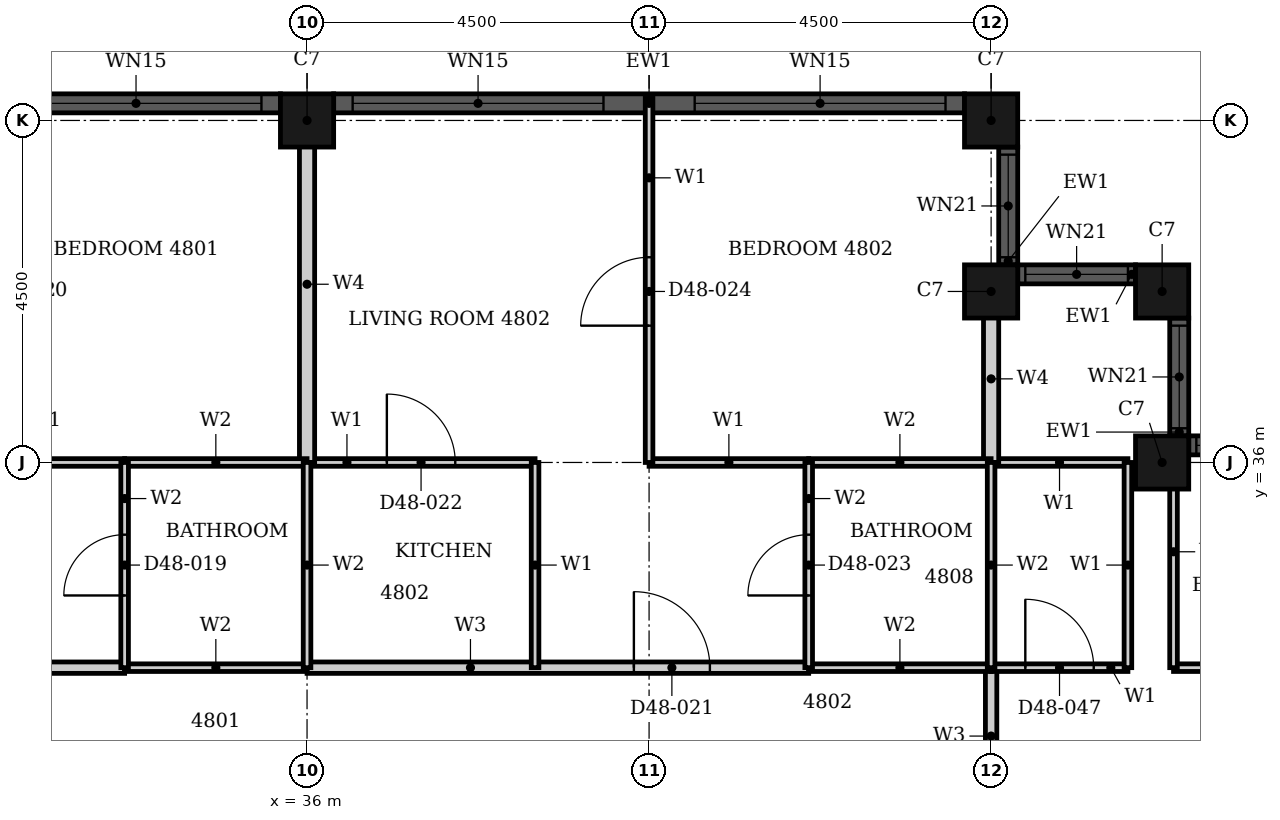
"""IFC4 building model, lengths in metres.
Left out: names, types, materials, properties, quantities, classifications, styles, units other than length and angle.
Written with IfcOpenShell. Run it as: python <this file> out.ifc"""

import sys

from ifc_helpers import new_model, si_unit, direction, frame, frame_2d, origin, origin_2d, place, context, subcontext, project, spatial, rectangle, hollow_rectangle, extrude, element, fill, save


model = new_model("IFC4")
c1 = context("Model", 3, precision=1e-05, world=origin(), true_north=direction((0.0, 1.0)))
c2 = subcontext(c1, "Body", "Model", "MODEL_VIEW")
j1 = project(units=[si_unit("LENGTHUNIT", "METRE"), si_unit("PLANEANGLEUNIT", "RADIAN")], contexts=[c1])
p1 = place(None, origin())
s1 = spatial("IfcSite", under=j1, at=p1, CompositionType="ELEMENT")
p2 = place(p1, origin())
s2 = spatial("IfcBuilding", under=s1, at=p2, CompositionType="ELEMENT")
p3 = place(p2, frame((0.0, 0.0, 192.4)))
s3 = spatial("IfcBuildingStorey", under=s2, at=p3, CompositionType="ELEMENT", Elevation=192.4)
for number, where, z_axis, x_axis in (
    (1, (47.25, 36.0, 0.0), (0.0, 0.0, 1.0), (1.0, 0.0, 0.0)),
    (2, (47.25, 38.25, 0.0), (0.0, 0.0, 1.0), (1.0, 0.0, 0.0)),
    (3, (45.0, 38.25, 0.0), (0.0, 0.0, 1.0), (1.0, 0.0, 0.0)),
    (4, (45.0, 40.5, 0.0), (0.0, 0.0, 1.0), (1.0, 0.0, 0.0)),
    (5, (36.0, 40.5, 0.0), (0.0, 0.0, 1.0), (1.0, 0.0, 0.0)),
):
    element("IfcColumn", number, at=place(p3, frame(where, z_axis=z_axis, x_axis=x_axis)), inside=s3, PredefinedType="COLUMN", context=c2, shape_type="SweptSolid", body=[
        extrude(hollow_rectangle(XDim=0.7, YDim=0.7, WallThickness=0.022, at=origin_2d()), origin(), (0.0, 0.0, 1.0), 3.7),
    ])
p4 = place(p3, frame((49.15, 36.225, 0.0), z_axis=(0.0, 0.0, 1.0), x_axis=(-1.0, 0.0, 0.0)))
e6 = element("IfcWall", 6, at=p4, inside=s3, PredefinedType="SOLIDWALL", context=c2, shape_type="SweptSolid", body=[
    extrude(rectangle(XDim=1.55, YDim=0.25, at=frame_2d((0.775, 0.0))), origin(), (0.0, 0.0, 1.0), 3.7),
])
p5 = place(p4, frame((0.1, 0.0, 0.9)))
e7 = element("IfcOpeningElement", 7, at=p5, cuts=e6, PredefinedType="OPENING", context=c2, shape_type="SweptSolid", body=[
    extrude(rectangle(XDim=1.35, YDim=1.85, at=frame_2d((0.675, 0.925))), frame((0.0, 0.135, 0.0), z_axis=(0.0, -1.0, 0.0), x_axis=(1.0, 0.0, 0.0)), (0.0, 0.0, 1.0), 0.27),
])
p6 = place(p3, frame((47.475, 36.35, 0.0), z_axis=(0.0, 0.0, 1.0), x_axis=(0.0, 1.0, 0.0)))
e8 = element("IfcWall", 8, at=p6, inside=s3, PredefinedType="SOLIDWALL", context=c2, shape_type="SweptSolid", body=[
    extrude(rectangle(XDim=1.55, YDim=0.25, at=frame_2d((0.775, 0.0))), origin(), (0.0, 0.0, 1.0), 3.7),
])
p7 = place(p6, frame((0.1, 0.0, 0.9)))
e9 = element("IfcOpeningElement", 9, at=p7, cuts=e8, PredefinedType="OPENING", context=c2, shape_type="SweptSolid", body=[
    extrude(rectangle(XDim=1.35, YDim=1.85, at=frame_2d((0.675, 0.925))), frame((0.0, 0.135, 0.0), z_axis=(0.0, -1.0, 0.0), x_axis=(1.0, 0.0, 0.0)), (0.0, 0.0, 1.0), 0.27),
])
p8 = place(p3, frame((46.9, 38.475, 0.0), z_axis=(0.0, 0.0, 1.0), x_axis=(-1.0, 0.0, 0.0)))
e10 = element("IfcWall", 10, at=p8, inside=s3, PredefinedType="SOLIDWALL", context=c2, shape_type="SweptSolid", body=[
    extrude(rectangle(XDim=1.55, YDim=0.25, at=frame_2d((0.775, 0.0))), origin(), (0.0, 0.0, 1.0), 3.7),
])
p9 = place(p8, frame((0.1, 0.0, 0.9)))
e11 = element("IfcOpeningElement", 11, at=p9, cuts=e10, PredefinedType="OPENING", context=c2, shape_type="SweptSolid", body=[
    extrude(rectangle(XDim=1.35, YDim=1.85, at=frame_2d((0.675, 0.925))), frame((0.0, 0.135, 0.0), z_axis=(0.0, -1.0, 0.0), x_axis=(1.0, 0.0, 0.0)), (0.0, 0.0, 1.0), 0.27),
])
p10 = place(p3, frame((45.225, 38.6, 0.0), z_axis=(0.0, 0.0, 1.0), x_axis=(0.0, 1.0, 0.0)))
e12 = element("IfcWall", 12, at=p10, inside=s3, PredefinedType="SOLIDWALL", context=c2, shape_type="SweptSolid", body=[
    extrude(rectangle(XDim=1.55, YDim=0.25, at=frame_2d((0.775, 0.0))), origin(), (0.0, 0.0, 1.0), 3.7),
])
p11 = place(p10, frame((0.1, 0.0, 0.9)))
e13 = element("IfcOpeningElement", 13, at=p11, cuts=e12, PredefinedType="OPENING", context=c2, shape_type="SweptSolid", body=[
    extrude(rectangle(XDim=1.35, YDim=1.85, at=frame_2d((0.675, 0.925))), frame((0.0, 0.135, 0.0), z_axis=(0.0, -1.0, 0.0), x_axis=(1.0, 0.0, 0.0)), (0.0, 0.0, 1.0), 0.27),
])
p12 = place(p3, frame((44.65, 40.725, 0.0), z_axis=(0.0, 0.0, 1.0), x_axis=(-1.0, 0.0, 0.0)))
e14 = element("IfcWall", 14, at=p12, inside=s3, PredefinedType="SOLIDWALL", context=c2, shape_type="SweptSolid", body=[
    extrude(rectangle(XDim=8.3, YDim=0.25, at=frame_2d((4.15, 0.0))), origin(), (0.0, 0.0, 1.0), 3.7),
])
p13 = place(p12, frame((0.25, 0.0, 0.45)))
e15 = element("IfcOpeningElement", 15, at=p13, cuts=e14, PredefinedType="OPENING", context=c2, shape_type="SweptSolid", body=[
    extrude(rectangle(XDim=3.3, YDim=2.3, at=frame_2d((1.65, 1.15))), frame((0.0, 0.135, 0.0), z_axis=(0.0, -1.0, 0.0), x_axis=(1.0, 0.0, 0.0)), (0.0, 0.0, 1.0), 0.27),
])
p14 = place(p12, frame((4.75, 0.0, 0.45)))
e16 = element("IfcOpeningElement", 16, at=p14, cuts=e14, PredefinedType="OPENING", context=c2, shape_type="SweptSolid", body=[
    extrude(rectangle(XDim=3.3, YDim=2.3, at=frame_2d((1.65, 1.15))), frame((0.0, 0.135, 0.0), z_axis=(0.0, -1.0, 0.0), x_axis=(1.0, 0.0, 0.0)), (0.0, 0.0, 1.0), 0.27),
])
p15 = place(p3, frame((35.65, 40.725, 0.0), z_axis=(0.0, 0.0, 1.0), x_axis=(-1.0, 0.0, 0.0)))
e17 = element("IfcWall", 17, at=p15, inside=s3, PredefinedType="SOLIDWALL", context=c2, shape_type="SweptSolid", body=[
    extrude(rectangle(XDim=8.3, YDim=0.25, at=frame_2d((4.15, 0.0))), origin(), (0.0, 0.0, 1.0), 3.7),
])
p16 = place(p15, frame((0.25, 0.0, 0.45)))
e18 = element("IfcOpeningElement", 18, at=p16, cuts=e17, PredefinedType="OPENING", context=c2, shape_type="SweptSolid", body=[
    extrude(rectangle(XDim=3.3, YDim=2.3, at=frame_2d((1.65, 1.15))), frame((0.0, 0.135, 0.0), z_axis=(0.0, -1.0, 0.0), x_axis=(1.0, 0.0, 0.0)), (0.0, 0.0, 1.0), 0.27),
])
p17 = place(p15, frame((4.75, 0.0, 0.45)))
e19 = element("IfcOpeningElement", 19, at=p17, cuts=e17, PredefinedType="OPENING", context=c2, shape_type="SweptSolid", body=[
    extrude(rectangle(XDim=3.3, YDim=2.3, at=frame_2d((1.65, 1.15))), frame((0.0, 0.135, 0.0), z_axis=(0.0, -1.0, 0.0), x_axis=(1.0, 0.0, 0.0)), (0.0, 0.0, 1.0), 0.27),
])
p18 = place(p3, frame((18.0, 33.3, 0.0), z_axis=(0.0, 0.0, 1.0), x_axis=(1.0, 0.0, 0.0)))
e20 = element("IfcWall", 20, at=p18, inside=s3, PredefinedType="PARTITIONING", context=c2, shape_type="SweptSolid", body=[
    extrude(rectangle(XDim=15.6, YDim=0.15, at=frame_2d((7.8, 0.0))), origin(), (0.0, 0.0, 1.0), 3.4),
])
p19 = place(p18, frame((4.0, 0.0, 0.0)))
e21 = element("IfcOpeningElement", 21, at=p19, cuts=e20, PredefinedType="OPENING", context=c2, shape_type="SweptSolid", body=[
    extrude(rectangle(XDim=1.0, YDim=2.1, at=frame_2d((0.5, 1.05))), frame((0.0, 0.085, 0.0), z_axis=(0.0, -1.0, 0.0), x_axis=(1.0, 0.0, 0.0)), (0.0, 0.0, 1.0), 0.17),
])
p20 = place(p18, frame((13.3, 0.0, 0.0)))
e22 = element("IfcOpeningElement", 22, at=p20, cuts=e20, PredefinedType="OPENING", context=c2, shape_type="SweptSolid", body=[
    extrude(rectangle(XDim=1.0, YDim=2.2, at=frame_2d((0.5, 1.1))), frame((0.0, 0.085, 0.0), z_axis=(0.0, -1.0, 0.0), x_axis=(1.0, 0.0, 0.0)), (0.0, 0.0, 1.0), 0.17),
])
p21 = place(p3, frame((36.0, 33.3, 0.0), z_axis=(0.0, 0.0, 1.0), x_axis=(1.0, 0.0, 0.0)))
e23 = element("IfcWall", 23, at=p21, inside=s3, PredefinedType="PARTITIONING", context=c2, shape_type="SweptSolid", body=[
    extrude(rectangle(XDim=6.6, YDim=0.15, at=frame_2d((3.3, 0.0))), origin(), (0.0, 0.0, 1.0), 3.4),
])
p22 = place(p21, frame((4.3, 0.0, 0.0)))
e24 = element("IfcOpeningElement", 24, at=p22, cuts=e23, PredefinedType="OPENING", context=c2, shape_type="SweptSolid", body=[
    extrude(rectangle(XDim=1.0, YDim=2.2, at=frame_2d((0.5, 1.1))), frame((0.0, 0.085, 0.0), z_axis=(0.0, -1.0, 0.0), x_axis=(1.0, 0.0, 0.0)), (0.0, 0.0, 1.0), 0.17),
])
p23 = place(p3, frame((45.0, 31.5, 0.0), z_axis=(0.0, 0.0, 1.0), x_axis=(0.0, 1.0, 0.0)))
e25 = element("IfcWall", 25, at=p23, inside=s3, PredefinedType="PARTITIONING", context=c2, shape_type="SweptSolid", body=[
    extrude(rectangle(XDim=1.8, YDim=0.15, at=frame_2d((0.9, 0.0))), origin(), (0.0, 0.0, 1.0), 3.4),
])
p24 = place(p3, frame((45.0, 33.3, 0.0), z_axis=(0.0, 0.0, 1.0), x_axis=(1.0, 0.0, 0.0)))
e26 = element("IfcWall", 26, at=p24, inside=s3, PredefinedType="PARTITIONING", context=c2, shape_type="SweptSolid", body=[
    extrude(rectangle(XDim=1.8, YDim=0.1, at=frame_2d((0.9, 0.0))), origin(), (0.0, 0.0, 1.0), 3.4),
])
p25 = place(p24, frame((0.45, 0.0, 0.0)))
e27 = element("IfcOpeningElement", 27, at=p25, cuts=e26, PredefinedType="OPENING", context=c2, shape_type="SweptSolid", body=[
    extrude(rectangle(XDim=0.9, YDim=2.1, at=frame_2d((0.45, 1.05))), frame((0.0, 0.06, 0.0), z_axis=(0.0, -1.0, 0.0), x_axis=(1.0, 0.0, 0.0)), (0.0, 0.0, 1.0), 0.12),
])
for number, where, z_axis, x_axis in (
    (28, (31.5, 36.0, 0.0), (0.0, 0.0, 1.0), (1.0, 0.0, 0.0)),
    (29, (40.5, 36.0, 0.0), (0.0, 0.0, 1.0), (1.0, 0.0, 0.0)),
):
    element("IfcWall", number, at=place(p3, frame(where, z_axis=z_axis, x_axis=x_axis)), inside=s3, PredefinedType="PARTITIONING", context=c2, shape_type="SweptSolid", body=[
        extrude(rectangle(XDim=2.1, YDim=0.1, at=frame_2d((1.05, 0.0))), origin(), (0.0, 0.0, 1.0), 3.4),
    ])
p26 = place(p3, frame((36.0, 36.0, 0.0), z_axis=(0.0, 0.0, 1.0), x_axis=(1.0, 0.0, 0.0)))
e30 = element("IfcWall", 30, at=p26, inside=s3, PredefinedType="PARTITIONING", context=c2, shape_type="SweptSolid", body=[
    extrude(rectangle(XDim=3.0, YDim=0.1, at=frame_2d((1.5, 0.0))), origin(), (0.0, 0.0, 1.0), 3.4),
])
p27 = place(p26, frame((1.05, 0.0, 0.0)))
e31 = element("IfcOpeningElement", 31, at=p27, cuts=e30, PredefinedType="OPENING", context=c2, shape_type="SweptSolid", body=[
    extrude(rectangle(XDim=0.9, YDim=2.1, at=frame_2d((0.45, 1.05))), frame((0.0, 0.06, 0.0), z_axis=(0.0, -1.0, 0.0), x_axis=(1.0, 0.0, 0.0)), (0.0, 0.0, 1.0), 0.12),
])
p28 = place(p3, frame((45.0, 36.0, 0.0), z_axis=(0.0, 0.0, 1.0), x_axis=(1.0, 0.0, 0.0)))
e32 = element("IfcWall", 32, at=p28, inside=s3, PredefinedType="PARTITIONING", context=c2, shape_type="SweptSolid", body=[
    extrude(rectangle(XDim=1.8, YDim=0.1, at=frame_2d((0.9, 0.0))), origin(), (0.0, 0.0, 1.0), 3.4),
])
p29 = place(p3, frame((39.0, 33.3, 0.0), z_axis=(0.0, 0.0, 1.0), x_axis=(0.0, 1.0, 0.0)))
e33 = element("IfcWall", 33, at=p29, inside=s3, PredefinedType="PARTITIONING", context=c2, shape_type="SweptSolid", body=[
    extrude(rectangle(XDim=2.7, YDim=0.1, at=frame_2d((1.35, 0.0))), origin(), (0.0, 0.0, 1.0), 3.4),
])
p30 = place(p3, frame((40.5, 36.0, 0.0), z_axis=(0.0, 0.0, 1.0), x_axis=(0.0, 1.0, 0.0)))
e34 = element("IfcWall", 34, at=p30, inside=s3, PredefinedType="PARTITIONING", context=c2, shape_type="SweptSolid", body=[
    extrude(rectangle(XDim=4.79, YDim=0.1, at=frame_2d((2.395, 0.0))), origin(), (0.0, 0.0, 1.0), 3.4),
])
p31 = place(p30, frame((1.8, 0.0, 0.0)))
e35 = element("IfcOpeningElement", 35, at=p31, cuts=e34, PredefinedType="OPENING", context=c2, shape_type="SweptSolid", body=[
    extrude(rectangle(XDim=0.9, YDim=2.1, at=frame_2d((0.45, 1.05))), frame((0.0, 0.06, 0.0), z_axis=(0.0, -1.0, 0.0), x_axis=(1.0, 0.0, 0.0)), (0.0, 0.0, 1.0), 0.12),
])
p32 = place(p3, frame((46.8, 33.3, 0.0), z_axis=(0.0, 0.0, 1.0), x_axis=(0.0, 1.0, 0.0)))
e36 = element("IfcWall", 36, at=p32, inside=s3, PredefinedType="PARTITIONING", context=c2, shape_type="SweptSolid", body=[
    extrude(rectangle(XDim=2.7, YDim=0.1, at=frame_2d((1.35, 0.0))), origin(), (0.0, 0.0, 1.0), 3.4),
])
p33 = place(p3, frame((36.0, 36.0, 0.0), z_axis=(0.0, 0.0, 1.0), x_axis=(0.0, 1.0, 0.0)))
e37 = element("IfcWall", 37, at=p33, inside=s3, PredefinedType="PARTITIONING", context=c2, shape_type="SweptSolid", body=[
    extrude(rectangle(XDim=4.69, YDim=0.2, at=frame_2d((2.345, 0.0))), origin(), (0.0, 0.0, 1.0), 3.4),
])
p34 = place(p3, frame((45.0, 36.0, 0.0), z_axis=(0.0, 0.0, 1.0), x_axis=(0.0, 1.0, 0.0)))
e38 = element("IfcWall", 38, at=p34, inside=s3, PredefinedType="PARTITIONING", context=c2, shape_type="SweptSolid", body=[
    extrude(rectangle(XDim=2.2, YDim=0.2, at=frame_2d((1.1, 0.0))), origin(), (0.0, 0.0, 1.0), 3.4),
])
for number, where, z_axis, x_axis in (
    (39, (33.6, 33.3, 0.0), (0.0, 0.0, 1.0), (1.0, 0.0, 0.0)),
    (40, (42.6, 33.3, 0.0), (0.0, 0.0, 1.0), (1.0, 0.0, 0.0)),
):
    element("IfcWall", number, at=place(p3, frame(where, z_axis=z_axis, x_axis=x_axis)), inside=s3, PredefinedType="PARTITIONING", context=c2, shape_type="SweptSolid", body=[
        extrude(rectangle(XDim=2.4, YDim=0.1, at=frame_2d((1.2, 0.0))), origin(), (0.0, 0.0, 1.0), 3.4),
    ])
p35 = place(p3, frame((47.4, 33.3, 0.0), z_axis=(0.0, 0.0, 1.0), x_axis=(1.0, 0.0, 0.0)))
e41 = element("IfcWall", 41, at=p35, inside=s3, PredefinedType="PARTITIONING", context=c2, shape_type="SweptSolid", body=[
    extrude(rectangle(XDim=2.2, YDim=0.1, at=frame_2d((1.1, 0.0))), origin(), (0.0, 0.0, 1.0), 3.4),
])
p36 = place(p35, frame((0.65, 0.0, 0.0)))
e42 = element("IfcOpeningElement", 42, at=p36, cuts=e41, PredefinedType="OPENING", context=c2, shape_type="SweptSolid", body=[
    extrude(rectangle(XDim=0.8, YDim=2.1, at=frame_2d((0.4, 1.05))), frame((0.0, 0.06, 0.0), z_axis=(0.0, -1.0, 0.0), x_axis=(1.0, 0.0, 0.0)), (0.0, 0.0, 1.0), 0.12),
])
for number, where, z_axis, x_axis in (
    (43, (33.6, 36.0, 0.0), (0.0, 0.0, 1.0), (1.0, 0.0, 0.0)),
    (44, (42.6, 36.0, 0.0), (0.0, 0.0, 1.0), (1.0, 0.0, 0.0)),
):
    element("IfcWall", number, at=place(p3, frame(where, z_axis=z_axis, x_axis=x_axis)), inside=s3, PredefinedType="PARTITIONING", context=c2, shape_type="SweptSolid", body=[
        extrude(rectangle(XDim=2.4, YDim=0.1, at=frame_2d((1.2, 0.0))), origin(), (0.0, 0.0, 1.0), 3.4),
    ])
p37 = place(p3, frame((33.6, 33.3, 0.0), z_axis=(0.0, 0.0, 1.0), x_axis=(0.0, 1.0, 0.0)))
e45 = element("IfcWall", 45, at=p37, inside=s3, PredefinedType="PARTITIONING", context=c2, shape_type="SweptSolid", body=[
    extrude(rectangle(XDim=2.7, YDim=0.1, at=frame_2d((1.35, 0.0))), origin(), (0.0, 0.0, 1.0), 3.4),
])
p38 = place(p37, frame((0.95, 0.0, 0.0)))
e46 = element("IfcOpeningElement", 46, at=p38, cuts=e45, PredefinedType="OPENING", context=c2, shape_type="SweptSolid", body=[
    extrude(rectangle(XDim=0.8, YDim=2.1, at=frame_2d((0.4, 1.05))), frame((0.0, 0.06, 0.0), z_axis=(0.0, -1.0, 0.0), x_axis=(1.0, 0.0, 0.0)), (0.0, 0.0, 1.0), 0.12),
])
p39 = place(p3, frame((36.0, 33.3, 0.0), z_axis=(0.0, 0.0, 1.0), x_axis=(0.0, 1.0, 0.0)))
e47 = element("IfcWall", 47, at=p39, inside=s3, PredefinedType="PARTITIONING", context=c2, shape_type="SweptSolid", body=[
    extrude(rectangle(XDim=2.7, YDim=0.1, at=frame_2d((1.35, 0.0))), origin(), (0.0, 0.0, 1.0), 3.4),
])
p40 = place(p3, frame((42.6, 33.3, 0.0), z_axis=(0.0, 0.0, 1.0), x_axis=(0.0, 1.0, 0.0)))
e48 = element("IfcWall", 48, at=p40, inside=s3, PredefinedType="PARTITIONING", context=c2, shape_type="SweptSolid", body=[
    extrude(rectangle(XDim=2.7, YDim=0.1, at=frame_2d((1.35, 0.0))), origin(), (0.0, 0.0, 1.0), 3.4),
])
p41 = place(p40, frame((0.95, 0.0, 0.0)))
e49 = element("IfcOpeningElement", 49, at=p41, cuts=e48, PredefinedType="OPENING", context=c2, shape_type="SweptSolid", body=[
    extrude(rectangle(XDim=0.8, YDim=2.1, at=frame_2d((0.4, 1.05))), frame((0.0, 0.06, 0.0), z_axis=(0.0, -1.0, 0.0), x_axis=(1.0, 0.0, 0.0)), (0.0, 0.0, 1.0), 0.12),
])
p42 = place(p3, frame((45.0, 33.3, 0.0), z_axis=(0.0, 0.0, 1.0), x_axis=(0.0, 1.0, 0.0)))
e50 = element("IfcWall", 50, at=p42, inside=s3, PredefinedType="PARTITIONING", context=c2, shape_type="SweptSolid", body=[
    extrude(rectangle(XDim=2.7, YDim=0.1, at=frame_2d((1.35, 0.0))), origin(), (0.0, 0.0, 1.0), 3.4),
])
p43 = place(p3, frame((47.4, 33.3, 0.0), z_axis=(0.0, 0.0, 1.0), x_axis=(0.0, 1.0, 0.0)))
e51 = element("IfcWall", 51, at=p43, inside=s3, PredefinedType="PARTITIONING", context=c2, shape_type="SweptSolid", body=[
    extrude(rectangle(XDim=3.05, YDim=0.1, at=frame_2d((1.525, 0.0))), origin(), (0.0, 0.0, 1.0), 3.4),
])
p44 = place(p5, origin())
e52 = element("IfcWindow", 52, at=p44, inside=s3, PartitioningType="SINGLE_PANEL", PredefinedType="WINDOW", context=c2, shape_type="SweptSolid", body=[
    extrude(rectangle(XDim=1.35, YDim=1.85, at=frame_2d((0.675, 0.925))), frame((0.0, 0.03, 0.0), z_axis=(0.0, -1.0, 0.0), x_axis=(1.0, 0.0, 0.0)), (0.0, 0.0, 1.0), 0.06),
])
fill(e7, e52)
p45 = place(p7, origin())
e53 = element("IfcWindow", 53, at=p45, inside=s3, PartitioningType="SINGLE_PANEL", PredefinedType="WINDOW", context=c2, shape_type="SweptSolid", body=[
    extrude(rectangle(XDim=1.35, YDim=1.85, at=frame_2d((0.675, 0.925))), frame((0.0, 0.03, 0.0), z_axis=(0.0, -1.0, 0.0), x_axis=(1.0, 0.0, 0.0)), (0.0, 0.0, 1.0), 0.06),
])
fill(e9, e53)
p46 = place(p9, origin())
e54 = element("IfcWindow", 54, at=p46, inside=s3, PartitioningType="SINGLE_PANEL", PredefinedType="WINDOW", context=c2, shape_type="SweptSolid", body=[
    extrude(rectangle(XDim=1.35, YDim=1.85, at=frame_2d((0.675, 0.925))), frame((0.0, 0.03, 0.0), z_axis=(0.0, -1.0, 0.0), x_axis=(1.0, 0.0, 0.0)), (0.0, 0.0, 1.0), 0.06),
])
fill(e11, e54)
p47 = place(p11, origin())
e55 = element("IfcWindow", 55, at=p47, inside=s3, PartitioningType="SINGLE_PANEL", PredefinedType="WINDOW", context=c2, shape_type="SweptSolid", body=[
    extrude(rectangle(XDim=1.35, YDim=1.85, at=frame_2d((0.675, 0.925))), frame((0.0, 0.03, 0.0), z_axis=(0.0, -1.0, 0.0), x_axis=(1.0, 0.0, 0.0)), (0.0, 0.0, 1.0), 0.06),
])
fill(e13, e55)
p48 = place(p13, origin())
e56 = element("IfcWindow", 56, at=p48, inside=s3, PartitioningType="SINGLE_PANEL", PredefinedType="WINDOW", context=c2, shape_type="SweptSolid", body=[
    extrude(rectangle(XDim=3.3, YDim=2.3, at=frame_2d((1.65, 1.15))), frame((0.0, 0.03, 0.0), z_axis=(0.0, -1.0, 0.0), x_axis=(1.0, 0.0, 0.0)), (0.0, 0.0, 1.0), 0.06),
])
fill(e15, e56)
p49 = place(p14, origin())
e57 = element("IfcWindow", 57, at=p49, inside=s3, PartitioningType="SINGLE_PANEL", PredefinedType="WINDOW", context=c2, shape_type="SweptSolid", body=[
    extrude(rectangle(XDim=3.3, YDim=2.3, at=frame_2d((1.65, 1.15))), frame((0.0, 0.03, 0.0), z_axis=(0.0, -1.0, 0.0), x_axis=(1.0, 0.0, 0.0)), (0.0, 0.0, 1.0), 0.06),
])
fill(e16, e57)
p50 = place(p16, origin())
e58 = element("IfcWindow", 58, at=p50, inside=s3, PartitioningType="SINGLE_PANEL", PredefinedType="WINDOW", context=c2, shape_type="SweptSolid", body=[
    extrude(rectangle(XDim=3.3, YDim=2.3, at=frame_2d((1.65, 1.15))), frame((0.0, 0.03, 0.0), z_axis=(0.0, -1.0, 0.0), x_axis=(1.0, 0.0, 0.0)), (0.0, 0.0, 1.0), 0.06),
])
fill(e18, e58)
p51 = place(p38, origin())
e59 = element("IfcDoor", 59, at=p51, inside=s3, OperationType="SINGLE_SWING_LEFT", PredefinedType="DOOR", context=c2, shape_type="SweptSolid", body=[
    extrude(rectangle(XDim=0.8, YDim=2.1, at=frame_2d((0.4, 1.05))), frame((0.0, 0.025, 0.0), z_axis=(0.0, -1.0, 0.0), x_axis=(1.0, 0.0, 0.0)), (0.0, 0.0, 1.0), 0.05),
])
fill(e46, e59)
p52 = place(p22, origin())
e60 = element("IfcDoor", 60, at=p52, inside=s3, OperationType="SINGLE_SWING_LEFT", PredefinedType="DOOR", context=c2, shape_type="SweptSolid", body=[
    extrude(rectangle(XDim=1.0, YDim=2.2, at=frame_2d((0.5, 1.1))), frame((0.0, 0.025, 0.0), z_axis=(0.0, -1.0, 0.0), x_axis=(1.0, 0.0, 0.0)), (0.0, 0.0, 1.0), 0.05),
])
fill(e24, e60)
p53 = place(p27, origin())
e61 = element("IfcDoor", 61, at=p53, inside=s3, OperationType="SINGLE_SWING_LEFT", PredefinedType="DOOR", context=c2, shape_type="SweptSolid", body=[
    extrude(rectangle(XDim=0.9, YDim=2.1, at=frame_2d((0.45, 1.05))), frame((0.0, 0.025, 0.0), z_axis=(0.0, -1.0, 0.0), x_axis=(1.0, 0.0, 0.0)), (0.0, 0.0, 1.0), 0.05),
])
fill(e31, e61)
p54 = place(p41, origin())
e62 = element("IfcDoor", 62, at=p54, inside=s3, OperationType="SINGLE_SWING_RIGHT", PredefinedType="DOOR", context=c2, shape_type="SweptSolid", body=[
    extrude(rectangle(XDim=0.8, YDim=2.1, at=frame_2d((0.4, 1.05))), frame((0.0, 0.025, 0.0), z_axis=(0.0, -1.0, 0.0), x_axis=(1.0, 0.0, 0.0)), (0.0, 0.0, 1.0), 0.05),
])
fill(e49, e62)
p55 = place(p31, origin())
e63 = element("IfcDoor", 63, at=p55, inside=s3, OperationType="SINGLE_SWING_RIGHT", PredefinedType="DOOR", context=c2, shape_type="SweptSolid", body=[
    extrude(rectangle(XDim=0.9, YDim=2.1, at=frame_2d((0.45, 1.05))), frame((0.0, 0.025, 0.0), z_axis=(0.0, -1.0, 0.0), x_axis=(1.0, 0.0, 0.0)), (0.0, 0.0, 1.0), 0.05),
])
fill(e35, e63)
p56 = place(p25, origin())
e64 = element("IfcDoor", 64, at=p56, inside=s3, OperationType="SINGLE_SWING_LEFT", PredefinedType="DOOR", context=c2, shape_type="SweptSolid", body=[
    extrude(rectangle(XDim=0.9, YDim=2.1, at=frame_2d((0.45, 1.05))), frame((0.0, 0.025, 0.0), z_axis=(0.0, -1.0, 0.0), x_axis=(1.0, 0.0, 0.0)), (0.0, 0.0, 1.0), 0.05),
])
fill(e27, e64)
save(model, sys.argv[1])
